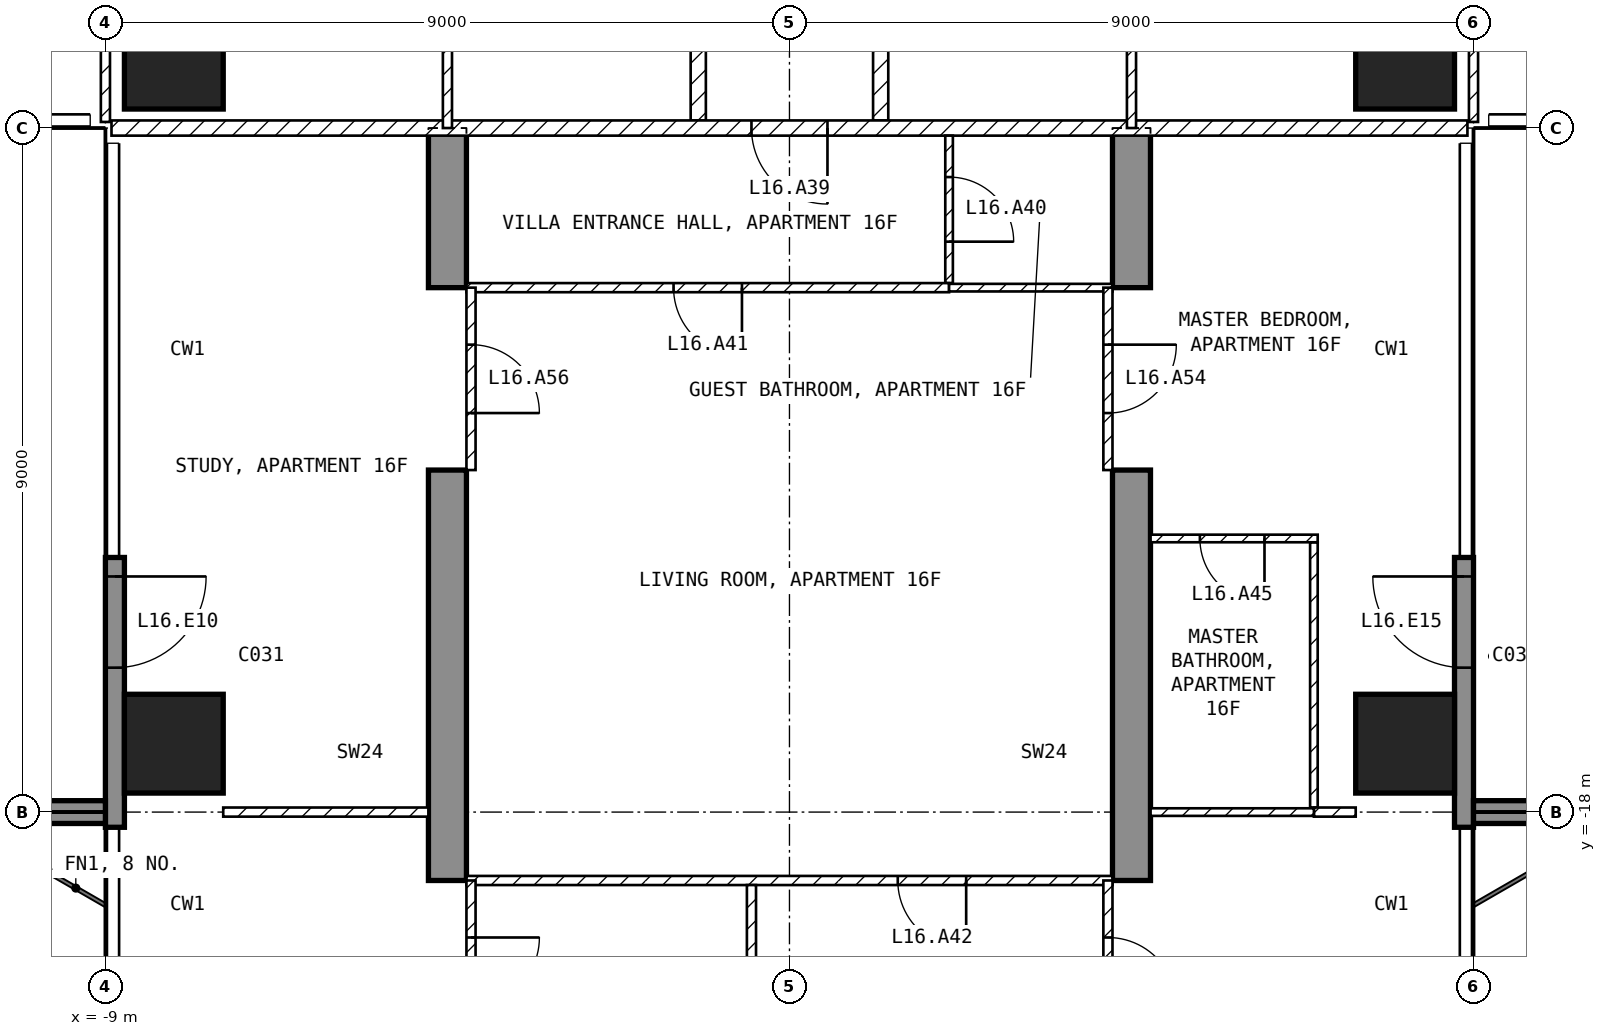
"""IFC4 building model, lengths in metres.
Left out: names, types, materials, properties, quantities, classifications, styles, units other than length and angle.
Written with IfcOpenShell. Run it as: python <this file> out.ifc"""

import sys

from ifc_helpers import new_model, si_unit, direction, frame, frame_2d, origin, origin_2d, place, context, subcontext, project, spatial, polyline, rectangle, outline, extrude, element, fill, save


model = new_model("IFC4")
c1 = context("Model", 3, precision=1e-05, world=origin(), true_north=direction((0.0, 1.0)))
c2 = subcontext(c1, "Body", "Model", "MODEL_VIEW")
j1 = project(units=[si_unit("LENGTHUNIT", "METRE"), si_unit("PLANEANGLEUNIT", "RADIAN")], contexts=[c1])
p1 = place(None, origin())
s1 = spatial("IfcSite", under=j1, at=p1, CompositionType="ELEMENT")
p2 = place(p1, origin())
s2 = spatial("IfcBuilding", under=s1, at=p2, CompositionType="ELEMENT")
p3 = place(p2, frame((0.0, 0.0, 75.0)))
s3 = spatial("IfcBuildingStorey", under=s2, at=p3, CompositionType="ELEMENT", Elevation=75.0)
for number, where, z_axis, x_axis in (
    (1, (-8.1, -17.1, -0.25), (0.0, 0.0, 1.0), (1.0, 0.0, 0.0)),
    (2, (-8.1, -8.1, -0.25), (0.0, 0.0, 1.0), (1.0, 0.0, 0.0)),
    (3, (8.1, -17.1, -0.25), (0.0, 0.0, 1.0), (1.0, 0.0, 0.0)),
    (4, (8.1, -8.1, -0.25), (0.0, 0.0, 1.0), (1.0, 0.0, 0.0)),
):
    element("IfcColumn", number, at=place(p3, frame(where, z_axis=z_axis, x_axis=x_axis)), inside=s3, PredefinedType="COLUMN", context=c2, shape_type="SweptSolid", body=[
        extrude(rectangle(XDim=1.3, YDim=1.3, at=origin_2d()), origin(), (0.0, 0.0, 1.0), 3.5),
    ])
for number, where, z_axis, x_axis in (
    (5, (-4.75, -25.45, -0.25), (1.0, 0.0, 0.0), (0.0, 1.0, 0.0)),
    (6, (4.25, -25.45, -0.25), (1.0, 0.0, 0.0), (0.0, 1.0, 0.0)),
):
    element("IfcWall", number, at=place(p3, frame(where, z_axis=z_axis, x_axis=x_axis)), inside=s3, PredefinedType="SHEAR", context=c2, shape_type="SweptSolid", body=[
        extrude(outline(polyline([(0.0, 0.0), (4.15, 0.0), (4.15, 2.65), (6.55, 2.65), (6.55, 0.0), (11.95, 0.0), (11.95, 2.65), (14.35, 2.65), (14.35, 0.0), (16.45, 0.0), (16.45, 3.5), (0.0, 3.5), (0.0, 0.0)])), origin(), (0.0, 0.0, 1.0), 0.5),
    ])
p4 = place(p3, frame((-8.875, -14.65, 0.0), z_axis=(0.0, 0.0, 1.0), x_axis=(0.0, -1.0, 0.0)))
e7 = element("IfcWall", 7, at=p4, inside=s3, PredefinedType="SOLIDWALL", context=c2, shape_type="SweptSolid", body=[
    extrude(rectangle(XDim=3.55, YDim=0.25, at=frame_2d((1.775, 0.0))), origin(), (0.0, 0.0, 1.0), 3.25),
])
p5 = place(p4, frame((0.25, 0.0, 0.0)))
e8 = element("IfcOpeningElement", 8, at=p5, cuts=e7, PredefinedType="OPENING", context=c2, shape_type="SweptSolid", body=[
    extrude(rectangle(XDim=1.2, YDim=2.4, at=frame_2d((0.6, 1.2))), frame((0.0, 0.135, 0.0), z_axis=(0.0, -1.0, 0.0), x_axis=(1.0, 0.0, 0.0)), (0.0, 0.0, 1.0), 0.27),
])
p6 = place(p3, frame((8.875, -18.2, 0.0), z_axis=(0.0, 0.0, 1.0), x_axis=(0.0, 1.0, 0.0)))
e9 = element("IfcWall", 9, at=p6, inside=s3, PredefinedType="SOLIDWALL", context=c2, shape_type="SweptSolid", body=[
    extrude(rectangle(XDim=3.55, YDim=0.25, at=frame_2d((1.775, 0.0))), origin(), (0.0, 0.0, 1.0), 3.25),
])
p7 = place(p6, frame((2.1, 0.0, 0.0)))
e10 = element("IfcOpeningElement", 10, at=p7, cuts=e9, PredefinedType="OPENING", context=c2, shape_type="SweptSolid", body=[
    extrude(rectangle(XDim=1.2, YDim=2.4, at=frame_2d((0.6, 1.2))), frame((0.0, 0.135, 0.0), z_axis=(0.0, -1.0, 0.0), x_axis=(1.0, 0.0, 0.0)), (0.0, 0.0, 1.0), 0.27),
])
for number, where, z_axis, x_axis in (
    (11, (-9.0, -18.0, 0.0), (0.0, 0.0, 1.0), (-1.0, 0.0, 0.0)),
    (12, (9.0, -18.0, 0.0), (0.0, 0.0, 1.0), (1.0, 0.0, 0.0)),
):
    element("IfcWall", number, at=place(p3, frame(where, z_axis=z_axis, x_axis=x_axis)), inside=s3, PredefinedType="SOLIDWALL", context=c2, shape_type="SweptSolid", body=[
        extrude(rectangle(XDim=2.7, YDim=0.3, at=frame_2d((1.35, 0.0))), origin(), (0.0, 0.0, 1.0), 3.25),
    ])
for number, where, z_axis, x_axis in (
    (13, (1.2, -1.3, 0.0), (0.0, 0.0, 1.0), (0.0, -1.0, 0.0)),
    (14, (-1.2, -8.9, 0.0), (0.0, 0.0, 1.0), (0.0, 1.0, 0.0)),
):
    element("IfcWall", number, at=place(p3, frame(where, z_axis=z_axis, x_axis=x_axis)), inside=s3, PredefinedType="PARTITIONING", context=c2, shape_type="SweptSolid", body=[
        extrude(rectangle(XDim=7.6, YDim=0.2, at=frame_2d((3.8, 0.0))), origin(), (0.0, 0.0, 1.0), 3.25),
    ])
p8 = place(p3, frame((8.92, -9.0, 0.0), z_axis=(0.0, 0.0, 1.0), x_axis=(-1.0, 0.0, 0.0)))
e15 = element("IfcWall", 15, at=p8, inside=s3, PredefinedType="PARTITIONING", context=c2, shape_type="SweptSolid", body=[
    extrude(rectangle(XDim=17.84, YDim=0.2, at=frame_2d((8.92, 0.0))), origin(), (0.0, 0.0, 1.0), 3.25),
])
p9 = place(p8, frame((8.42, 0.0, 0.0)))
e16 = element("IfcOpeningElement", 16, at=p9, cuts=e15, PredefinedType="OPENING", context=c2, shape_type="SweptSolid", body=[
    extrude(rectangle(XDim=1.0, YDim=2.1, at=frame_2d((0.5, 1.05))), frame((0.0, 0.11, 0.0), z_axis=(0.0, -1.0, 0.0), x_axis=(1.0, 0.0, 0.0)), (0.0, 0.0, 1.0), 0.22),
])
p10 = place(p3, frame((9.0, -8.92, 0.0), z_axis=(0.0, 0.0, 1.0), x_axis=(0.0, 1.0, 0.0)))
e17 = element("IfcWall", 17, at=p10, inside=s3, PredefinedType="PARTITIONING", context=c2, shape_type="SweptSolid", body=[
    extrude(rectangle(XDim=7.62, YDim=0.12, at=frame_2d((3.81, 0.0))), origin(), (0.0, 0.0, 1.0), 3.25),
])
p11 = place(p10, frame((2.67, 0.0, 0.0)))
e18 = element("IfcOpeningElement", 18, at=p11, cuts=e17, PredefinedType="OPENING", context=c2, shape_type="SweptSolid", body=[
    extrude(rectangle(XDim=0.9, YDim=2.1, at=frame_2d((0.45, 1.05))), frame((0.0, 0.07, 0.0), z_axis=(0.0, -1.0, 0.0), x_axis=(1.0, 0.0, 0.0)), (0.0, 0.0, 1.0), 0.14),
])
p12 = place(p3, frame((4.5, -9.0, 0.0), z_axis=(0.0, 0.0, 1.0), x_axis=(0.0, 1.0, 0.0)))
e19 = element("IfcWall", 19, at=p12, inside=s3, PredefinedType="PARTITIONING", context=c2, shape_type="SweptSolid", body=[
    extrude(rectangle(XDim=7.7, YDim=0.12, at=frame_2d((3.85, 0.0))), origin(), (0.0, 0.0, 1.0), 3.25),
])
p13 = place(p12, frame((3.4, 0.0, 0.0)))
e20 = element("IfcOpeningElement", 20, at=p13, cuts=e19, PredefinedType="OPENING", context=c2, shape_type="SweptSolid", body=[
    extrude(rectangle(XDim=0.9, YDim=2.1, at=frame_2d((0.45, 1.05))), frame((0.0, 0.07, 0.0), z_axis=(0.0, -1.0, 0.0), x_axis=(1.0, 0.0, 0.0)), (0.0, 0.0, 1.0), 0.14),
])
p14 = place(p3, frame((-9.0, -1.3, 0.0), z_axis=(0.0, 0.0, 1.0), x_axis=(0.0, -1.0, 0.0)))
e21 = element("IfcWall", 21, at=p14, inside=s3, PredefinedType="PARTITIONING", context=c2, shape_type="SweptSolid", body=[
    extrude(rectangle(XDim=7.62, YDim=0.12, at=frame_2d((3.81, 0.0))), origin(), (0.0, 0.0, 1.0), 3.25),
])
p15 = place(p14, frame((0.85, 0.0, 0.0)))
e22 = element("IfcOpeningElement", 22, at=p15, cuts=e21, PredefinedType="OPENING", context=c2, shape_type="SweptSolid", body=[
    extrude(rectangle(XDim=0.9, YDim=2.1, at=frame_2d((0.45, 1.05))), frame((0.0, 0.07, 0.0), z_axis=(0.0, -1.0, 0.0), x_axis=(1.0, 0.0, 0.0)), (0.0, 0.0, 1.0), 0.14),
])
p16 = place(p3, frame((-4.5, -1.3, 0.0), z_axis=(0.0, 0.0, 1.0), x_axis=(0.0, -1.0, 0.0)))
e23 = element("IfcWall", 23, at=p16, inside=s3, PredefinedType="PARTITIONING", context=c2, shape_type="SweptSolid", body=[
    extrude(rectangle(XDim=7.7, YDim=0.12, at=frame_2d((3.85, 0.0))), origin(), (0.0, 0.0, 1.0), 3.25),
])
p17 = place(p16, frame((1.84, 0.0, 0.0)))
e24 = element("IfcOpeningElement", 24, at=p17, cuts=e23, PredefinedType="OPENING", context=c2, shape_type="SweptSolid", body=[
    extrude(rectangle(XDim=0.9, YDim=2.1, at=frame_2d((0.45, 1.05))), frame((0.0, 0.07, 0.0), z_axis=(0.0, -1.0, 0.0), x_axis=(1.0, 0.0, 0.0)), (0.0, 0.0, 1.0), 0.14),
])
p18 = place(p3, frame((2.1, -9.1, 0.0), z_axis=(0.0, 0.0, 1.0), x_axis=(0.0, -1.0, 0.0)))
e25 = element("IfcWall", 25, at=p18, inside=s3, PredefinedType="PARTITIONING", context=c2, shape_type="SweptSolid", body=[
    extrude(rectangle(XDim=1.94, YDim=0.1, at=frame_2d((0.97, 0.0))), origin(), (0.0, 0.0, 1.0), 3.25),
])
p19 = place(p18, frame((0.545, 0.0, 0.0)))
e26 = element("IfcOpeningElement", 26, at=p19, cuts=e25, PredefinedType="OPENING", context=c2, shape_type="SweptSolid", body=[
    extrude(rectangle(XDim=0.85, YDim=2.1, at=frame_2d((0.425, 1.05))), frame((0.0, 0.06, 0.0), z_axis=(0.0, -1.0, 0.0), x_axis=(1.0, 0.0, 0.0)), (0.0, 0.0, 1.0), 0.12),
])
p20 = place(p3, frame((2.1, -11.1, 0.0), z_axis=(0.0, 0.0, 1.0), x_axis=(-1.0, 0.0, 0.0)))
e27 = element("IfcWall", 27, at=p20, inside=s3, PredefinedType="PARTITIONING", context=c2, shape_type="SweptSolid", body=[
    extrude(rectangle(XDim=6.35, YDim=0.12, at=frame_2d((3.175, 0.0))), origin(), (0.0, 0.0, 1.0), 3.25),
])
p21 = place(p20, frame((2.725, 0.0, 0.0)))
e28 = element("IfcOpeningElement", 28, at=p21, cuts=e27, PredefinedType="OPENING", context=c2, shape_type="SweptSolid", body=[
    extrude(rectangle(XDim=0.9, YDim=2.1, at=frame_2d((0.45, 1.05))), frame((0.0, 0.07, 0.0), z_axis=(0.0, -1.0, 0.0), x_axis=(1.0, 0.0, 0.0)), (0.0, 0.0, 1.0), 0.14),
])
p22 = place(p3, frame((4.25, -11.1, 0.0), z_axis=(0.0, 0.0, 1.0), x_axis=(-1.0, 0.0, 0.0)))
e29 = element("IfcWall", 29, at=p22, inside=s3, PredefinedType="PARTITIONING", context=c2, shape_type="SweptSolid", body=[
    extrude(rectangle(XDim=2.15, YDim=0.1, at=frame_2d((1.075, 0.0))), origin(), (0.0, 0.0, 1.0), 3.25),
])
p23 = place(p3, frame((4.25, -18.9, 0.0), z_axis=(0.0, 0.0, 1.0), x_axis=(-1.0, 0.0, 0.0)))
e30 = element("IfcWall", 30, at=p23, inside=s3, PredefinedType="PARTITIONING", context=c2, shape_type="SweptSolid", body=[
    extrude(rectangle(XDim=8.5, YDim=0.12, at=frame_2d((4.25, 0.0))), origin(), (0.0, 0.0, 1.0), 3.25),
])
p24 = place(p23, frame((1.925, 0.0, 0.0)))
e31 = element("IfcOpeningElement", 31, at=p24, cuts=e30, PredefinedType="OPENING", context=c2, shape_type="SweptSolid", body=[
    extrude(rectangle(XDim=0.9, YDim=2.1, at=frame_2d((0.45, 1.05))), frame((0.0, 0.07, 0.0), z_axis=(0.0, -1.0, 0.0), x_axis=(1.0, 0.0, 0.0)), (0.0, 0.0, 1.0), 0.14),
])
p25 = place(p3, frame((-0.5, -23.34, 0.0), z_axis=(0.0, 0.0, 1.0), x_axis=(0.0, 1.0, 0.0)))
e32 = element("IfcWall", 32, at=p25, inside=s3, PredefinedType="PARTITIONING", context=c2, shape_type="SweptSolid", body=[
    extrude(rectangle(XDim=4.38, YDim=0.12, at=frame_2d((2.19, 0.0))), origin(), (0.0, 0.0, 1.0), 3.25),
])
p26 = place(p25, frame((1.74, 0.0, 0.0)))
e33 = element("IfcOpeningElement", 33, at=p26, cuts=e32, PredefinedType="OPENING", context=c2, shape_type="SweptSolid", body=[
    extrude(rectangle(XDim=0.9, YDim=2.1, at=frame_2d((0.45, 1.05))), frame((0.0, 0.07, 0.0), z_axis=(0.0, -1.0, 0.0), x_axis=(1.0, 0.0, 0.0)), (0.0, 0.0, 1.0), 0.14),
])
p27 = place(p3, frame((6.9, -17.94, 0.0), z_axis=(0.0, 0.0, 1.0), x_axis=(0.0, 1.0, 0.0)))
e34 = element("IfcWall", 34, at=p27, inside=s3, PredefinedType="PARTITIONING", context=c2, shape_type="SweptSolid", body=[
    extrude(rectangle(XDim=3.49, YDim=0.1, at=frame_2d((1.745, 0.0))), origin(), (0.0, 0.0, 1.0), 3.25),
])
p28 = place(p3, frame((6.95, -14.4, 0.0), z_axis=(0.0, 0.0, 1.0), x_axis=(-1.0, 0.0, 0.0)))
e35 = element("IfcWall", 35, at=p28, inside=s3, PredefinedType="PARTITIONING", context=c2, shape_type="SweptSolid", body=[
    extrude(rectangle(XDim=2.2, YDim=0.1, at=frame_2d((1.1, 0.0))), origin(), (0.0, 0.0, 1.0), 3.25),
])
p29 = place(p28, frame((0.7, 0.0, 0.0)))
e36 = element("IfcOpeningElement", 36, at=p29, cuts=e35, PredefinedType="OPENING", context=c2, shape_type="SweptSolid", body=[
    extrude(rectangle(XDim=0.85, YDim=2.1, at=frame_2d((0.425, 1.05))), frame((0.0, 0.06, 0.0), z_axis=(0.0, -1.0, 0.0), x_axis=(1.0, 0.0, 0.0)), (0.0, 0.0, 1.0), 0.12),
])
p30 = place(p3, frame((7.45, -18.0, 0.0), z_axis=(0.0, 0.0, 1.0), x_axis=(-1.0, 0.0, 0.0)))
e37 = element("IfcWall", 37, at=p30, inside=s3, PredefinedType="PARTITIONING", context=c2, shape_type="SweptSolid", body=[
    extrude(rectangle(XDim=0.55, YDim=0.12, at=frame_2d((0.275, 0.0))), origin(), (0.0, 0.0, 1.0), 3.25),
])
p31 = place(p3, frame((6.9, -18.0, 0.0), z_axis=(0.0, 0.0, 1.0), x_axis=(-1.0, 0.0, 0.0)))
e38 = element("IfcWall", 38, at=p31, inside=s3, PredefinedType="PARTITIONING", context=c2, shape_type="SweptSolid", body=[
    extrude(rectangle(XDim=2.15, YDim=0.1, at=frame_2d((1.075, 0.0))), origin(), (0.0, 0.0, 1.0), 3.25),
])
p32 = place(p3, frame((-4.75, -18.0, 0.0), z_axis=(0.0, 0.0, 1.0), x_axis=(-1.0, 0.0, 0.0)))
e39 = element("IfcWall", 39, at=p32, inside=s3, PredefinedType="PARTITIONING", context=c2, shape_type="SweptSolid", body=[
    extrude(rectangle(XDim=2.7, YDim=0.12, at=frame_2d((1.35, 0.0))), origin(), (0.0, 0.0, 1.0), 3.25),
])
p33 = place(p3, frame((4.19, -11.1, 0.0), z_axis=(0.0, 0.0, 1.0), x_axis=(0.0, -1.0, 0.0)))
e40 = element("IfcWall", 40, at=p33, inside=s3, PredefinedType="PARTITIONING", context=c2, shape_type="SweptSolid", body=[
    extrude(rectangle(XDim=2.4, YDim=0.12, at=frame_2d((1.2, 0.0))), origin(), (0.0, 0.0, 1.0), 2.4),
])
p34 = place(p33, frame((0.75, 0.0, 0.0)))
e41 = element("IfcOpeningElement", 41, at=p34, cuts=e40, PredefinedType="OPENING", context=c2, shape_type="SweptSolid", body=[
    extrude(rectangle(XDim=0.9, YDim=2.1, at=frame_2d((0.45, 1.05))), frame((0.0, 0.07, 0.0), z_axis=(0.0, -1.0, 0.0), x_axis=(1.0, 0.0, 0.0)), (0.0, 0.0, 1.0), 0.14),
])
p35 = place(p3, frame((4.19, -18.9, 0.0), z_axis=(0.0, 0.0, 1.0), x_axis=(0.0, -1.0, 0.0)))
e42 = element("IfcWall", 42, at=p35, inside=s3, PredefinedType="PARTITIONING", context=c2, shape_type="SweptSolid", body=[
    extrude(rectangle(XDim=2.4, YDim=0.12, at=frame_2d((1.2, 0.0))), origin(), (0.0, 0.0, 1.0), 2.4),
])
p36 = place(p35, frame((0.75, 0.0, 0.0)))
e43 = element("IfcOpeningElement", 43, at=p36, cuts=e42, PredefinedType="OPENING", context=c2, shape_type="SweptSolid", body=[
    extrude(rectangle(XDim=0.9, YDim=2.1, at=frame_2d((0.45, 1.05))), frame((0.0, 0.07, 0.0), z_axis=(0.0, -1.0, 0.0), x_axis=(1.0, 0.0, 0.0)), (0.0, 0.0, 1.0), 0.14),
])
p37 = place(p3, frame((-4.19, -11.1, 0.0), z_axis=(0.0, 0.0, 1.0), x_axis=(0.0, -1.0, 0.0)))
e44 = element("IfcWall", 44, at=p37, inside=s3, PredefinedType="PARTITIONING", context=c2, shape_type="SweptSolid", body=[
    extrude(rectangle(XDim=2.4, YDim=0.12, at=frame_2d((1.2, 0.0))), origin(), (0.0, 0.0, 1.0), 2.4),
])
p38 = place(p37, frame((0.75, 0.0, 0.0)))
e45 = element("IfcOpeningElement", 45, at=p38, cuts=e44, PredefinedType="OPENING", context=c2, shape_type="SweptSolid", body=[
    extrude(rectangle(XDim=0.9, YDim=2.1, at=frame_2d((0.45, 1.05))), frame((0.0, 0.07, 0.0), z_axis=(0.0, -1.0, 0.0), x_axis=(1.0, 0.0, 0.0)), (0.0, 0.0, 1.0), 0.14),
])
p39 = place(p3, frame((-4.19, -18.9, 0.0), z_axis=(0.0, 0.0, 1.0), x_axis=(0.0, -1.0, 0.0)))
e46 = element("IfcWall", 46, at=p39, inside=s3, PredefinedType="PARTITIONING", context=c2, shape_type="SweptSolid", body=[
    extrude(rectangle(XDim=2.4, YDim=0.12, at=frame_2d((1.2, 0.0))), origin(), (0.0, 0.0, 1.0), 2.4),
])
p40 = place(p39, frame((0.75, 0.0, 0.0)))
e47 = element("IfcOpeningElement", 47, at=p40, cuts=e46, PredefinedType="OPENING", context=c2, shape_type="SweptSolid", body=[
    extrude(rectangle(XDim=0.9, YDim=2.1, at=frame_2d((0.45, 1.05))), frame((0.0, 0.07, 0.0), z_axis=(0.0, -1.0, 0.0), x_axis=(1.0, 0.0, 0.0)), (0.0, 0.0, 1.0), 0.14),
])
p41 = place(p5, origin())
e48 = element("IfcDoor", 48, at=p41, inside=s3, OperationType="SINGLE_SWING_LEFT", PredefinedType="DOOR", context=c2, shape_type="SweptSolid", body=[
    extrude(rectangle(XDim=1.2, YDim=2.4, at=frame_2d((0.6, 1.2))), frame((0.0, 0.025, 0.0), z_axis=(0.0, -1.0, 0.0), x_axis=(1.0, 0.0, 0.0)), (0.0, 0.0, 1.0), 0.05),
])
fill(e8, e48)
p42 = place(p7, origin())
e49 = element("IfcDoor", 49, at=p42, inside=s3, OperationType="SINGLE_SWING_RIGHT", PredefinedType="DOOR", context=c2, shape_type="SweptSolid", body=[
    extrude(rectangle(XDim=1.2, YDim=2.4, at=frame_2d((0.6, 1.2))), frame((0.0, 0.025, 0.0), z_axis=(0.0, -1.0, 0.0), x_axis=(1.0, 0.0, 0.0)), (0.0, 0.0, 1.0), 0.05),
])
fill(e10, e49)
p43 = place(p9, origin())
e50 = element("IfcDoor", 50, at=p43, inside=s3, OperationType="SINGLE_SWING_LEFT", PredefinedType="DOOR", context=c2, shape_type="SweptSolid", body=[
    extrude(rectangle(XDim=1.0, YDim=2.1, at=frame_2d((0.5, 1.05))), frame((0.0, 0.025, 0.0), z_axis=(0.0, -1.0, 0.0), x_axis=(1.0, 0.0, 0.0)), (0.0, 0.0, 1.0), 0.05),
])
fill(e16, e50)
p44 = place(p19, origin())
e51 = element("IfcDoor", 51, at=p44, inside=s3, OperationType="SINGLE_SWING_RIGHT", PredefinedType="DOOR", context=c2, shape_type="SweptSolid", body=[
    extrude(rectangle(XDim=0.85, YDim=2.1, at=frame_2d((0.425, 1.05))), frame((0.0, 0.025, 0.0), z_axis=(0.0, -1.0, 0.0), x_axis=(1.0, 0.0, 0.0)), (0.0, 0.0, 1.0), 0.05),
])
fill(e26, e51)
p45 = place(p21, origin())
e52 = element("IfcDoor", 52, at=p45, inside=s3, OperationType="SINGLE_SWING_LEFT", PredefinedType="DOOR", context=c2, shape_type="SweptSolid", body=[
    extrude(rectangle(XDim=0.9, YDim=2.1, at=frame_2d((0.45, 1.05))), frame((0.0, 0.025, 0.0), z_axis=(0.0, -1.0, 0.0), x_axis=(1.0, 0.0, 0.0)), (0.0, 0.0, 1.0), 0.05),
])
fill(e28, e52)
p46 = place(p24, origin())
e53 = element("IfcDoor", 53, at=p46, inside=s3, OperationType="SINGLE_SWING_LEFT", PredefinedType="DOOR", context=c2, shape_type="SweptSolid", body=[
    extrude(rectangle(XDim=0.9, YDim=2.1, at=frame_2d((0.45, 1.05))), frame((0.0, 0.025, 0.0), z_axis=(0.0, -1.0, 0.0), x_axis=(1.0, 0.0, 0.0)), (0.0, 0.0, 1.0), 0.05),
])
fill(e31, e53)
p47 = place(p29, origin())
e54 = element("IfcDoor", 54, at=p47, inside=s3, OperationType="SINGLE_SWING_LEFT", PredefinedType="DOOR", context=c2, shape_type="SweptSolid", body=[
    extrude(rectangle(XDim=0.85, YDim=2.1, at=frame_2d((0.425, 1.05))), frame((0.0, 0.025, 0.0), z_axis=(0.0, -1.0, 0.0), x_axis=(1.0, 0.0, 0.0)), (0.0, 0.0, 1.0), 0.05),
])
fill(e36, e54)
p48 = place(p34, origin())
e55 = element("IfcDoor", 55, at=p48, inside=s3, OperationType="SINGLE_SWING_LEFT", PredefinedType="DOOR", context=c2, shape_type="SweptSolid", body=[
    extrude(rectangle(XDim=0.9, YDim=2.1, at=frame_2d((0.45, 1.05))), frame((0.0, 0.025, 0.0), z_axis=(0.0, -1.0, 0.0), x_axis=(1.0, 0.0, 0.0)), (0.0, 0.0, 1.0), 0.05),
])
fill(e41, e55)
p49 = place(p36, origin())
e56 = element("IfcDoor", 56, at=p49, inside=s3, OperationType="SINGLE_SWING_RIGHT", PredefinedType="DOOR", context=c2, shape_type="SweptSolid", body=[
    extrude(rectangle(XDim=0.9, YDim=2.1, at=frame_2d((0.45, 1.05))), frame((0.0, 0.025, 0.0), z_axis=(0.0, -1.0, 0.0), x_axis=(1.0, 0.0, 0.0)), (0.0, 0.0, 1.0), 0.05),
])
fill(e43, e56)
p50 = place(p38, origin())
e57 = element("IfcDoor", 57, at=p50, inside=s3, OperationType="SINGLE_SWING_RIGHT", PredefinedType="DOOR", context=c2, shape_type="SweptSolid", body=[
    extrude(rectangle(XDim=0.9, YDim=2.1, at=frame_2d((0.45, 1.05))), frame((0.0, 0.025, 0.0), z_axis=(0.0, -1.0, 0.0), x_axis=(1.0, 0.0, 0.0)), (0.0, 0.0, 1.0), 0.05),
])
fill(e45, e57)
p51 = place(p40, origin())
e58 = element("IfcDoor", 58, at=p51, inside=s3, OperationType="SINGLE_SWING_LEFT", PredefinedType="DOOR", context=c2, shape_type="SweptSolid", body=[
    extrude(rectangle(XDim=0.9, YDim=2.1, at=frame_2d((0.45, 1.05))), frame((0.0, 0.025, 0.0), z_axis=(0.0, -1.0, 0.0), x_axis=(1.0, 0.0, 0.0)), (0.0, 0.0, 1.0), 0.05),
])
fill(e47, e58)
save(model, sys.argv[1])
